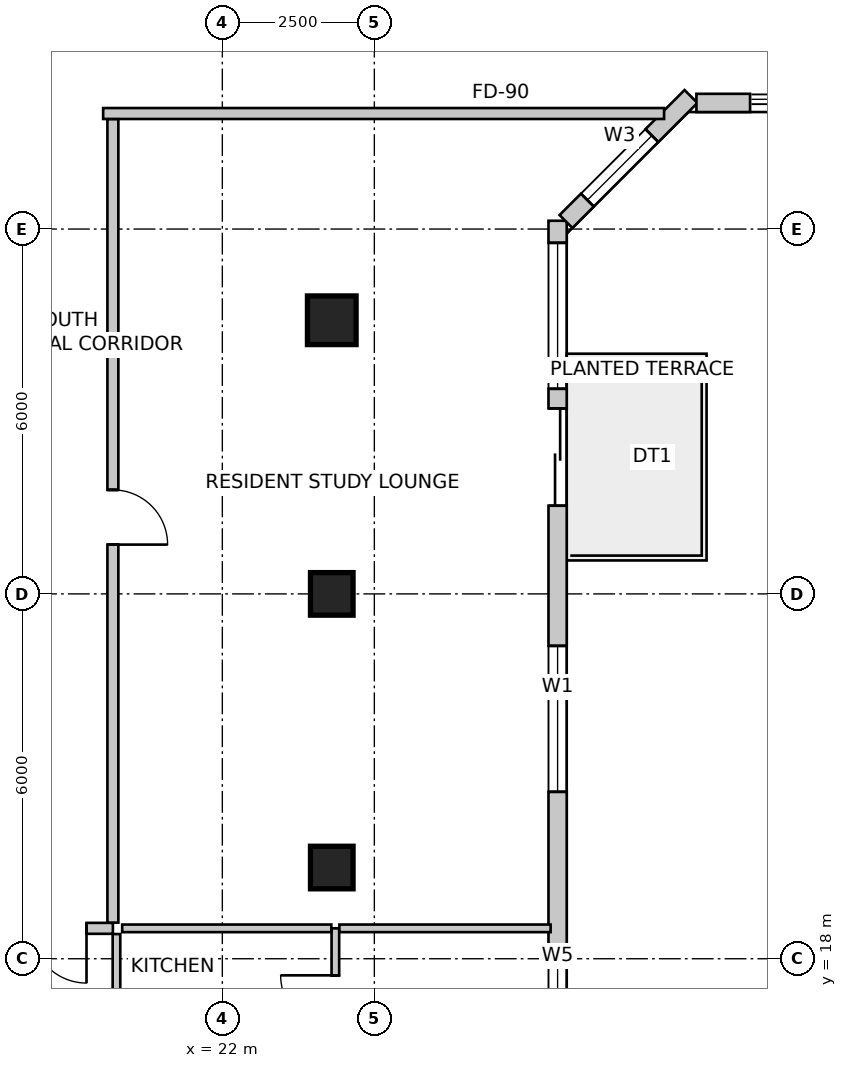
"""IFC4 building model, lengths in metres.
Left out: names, types, materials, properties, quantities, classifications, styles, units other than length and angle.
Written with IfcOpenShell. Run it as: python <this file> out.ifc"""

import sys

from ifc_helpers import new_model, si_unit, direction, frame, frame_2d, origin, origin_2d, place, context, subcontext, project, spatial, rectangle, extrude, source, transform, mapped, element, fill, save


model = new_model("IFC4")
c1 = context("Model", 3, precision=1e-05, world=origin(), true_north=direction((0.0, 1.0)))
c2 = subcontext(c1, "Body", "Model", "MODEL_VIEW")
j1 = project(units=[si_unit("LENGTHUNIT", "METRE"), si_unit("PLANEANGLEUNIT", "RADIAN")], contexts=[c1])
p1 = place(None, origin())
s1 = spatial("IfcSite", under=j1, at=p1, CompositionType="ELEMENT")
p2 = place(p1, origin())
s2 = spatial("IfcBuilding", under=s1, at=p2, CompositionType="ELEMENT")
p3 = place(p2, frame((0.0, 0.0, 193.9)))
s3 = spatial("IfcBuildingStorey", under=s2, at=p3, CompositionType="ELEMENT", Elevation=193.9)
m1 = source(origin(), c2, "Body", "SweptSolid", [
    extrude(rectangle(XDim=0.8, YDim=0.8, at=origin_2d()), origin(), (0.0, 0.0, 1.0), 3.5),
])
p4 = place(p3, frame((23.8, 28.5, 0.0), z_axis=(0.0, 0.0, 1.0), x_axis=(1.0, 0.0, 0.0)))
e1 = element("IfcColumn", 1, at=p4, inside=s3, PredefinedType="COLUMN", context=c2, shape_type="MappedRepresentation", body=[
    mapped(m1, transform((0.0, 0.0, 0.0), scale=1.0)),
])
m2 = source(origin(), c2, "Body", "SweptSolid", [
    extrude(rectangle(XDim=0.7, YDim=0.7, at=origin_2d()), origin(), (0.0, 0.0, 1.0), 3.5),
])
for number, where, z_axis, x_axis in (
    (2, (23.8, 24.0, 0.0), (0.0, 0.0, 1.0), (1.0, 0.0, 0.0)),
    (3, (23.8, 19.5, 0.0), (0.0, 0.0, 1.0), (1.0, 0.0, 0.0)),
):
    element("IfcColumn", number, at=place(p3, frame(where, z_axis=z_axis, x_axis=x_axis)), inside=s3, PredefinedType="COLUMN", context=c2, shape_type="MappedRepresentation", body=[
        mapped(m2, transform((0.0, 0.0, 0.0), scale=1.0)),
    ])
p5 = place(p3, frame((27.514, 16.457, 0.0), z_axis=(0.0, 0.0, 1.0), x_axis=(0.0, 1.0, 0.0)))
e4 = element("IfcWall", 4, at=p5, inside=s3, PredefinedType="SOLIDWALL", context=c2, shape_type="SweptSolid", body=[
    extrude(rectangle(XDim=13.679, YDim=0.3, at=frame_2d((6.839, 0.0))), origin(), (0.0, 0.0, 1.0), 3.25),
])
m3 = source(origin(), c2, "Body", "SweptSolid", [
    extrude(rectangle(XDim=1.6, YDim=2.15, at=frame_2d((0.8, 1.075))), frame((0.0, 0.16, 0.0), z_axis=(0.0, -1.0, 0.0), x_axis=(1.0, 0.0, 0.0)), (0.0, 0.0, 1.0), 0.32),
])
p6 = place(p5, frame((8.993, 0.0, 0.0)))
e5 = element("IfcOpeningElement", 5, at=p6, cuts=e4, PredefinedType="OPENING", context=c2, shape_type="MappedRepresentation", body=[
    mapped(m3, transform((0.0, 0.0, 0.0), scale=1.0)),
])
m4 = source(origin(), c2, "Body", "SweptSolid", [
    extrude(rectangle(XDim=1.2, YDim=1.6, at=frame_2d((0.6, 0.8))), frame((0.0, 0.16, 0.0), z_axis=(0.0, -1.0, 0.0), x_axis=(1.0, 0.0, 0.0)), (0.0, 0.0, 1.0), 0.32),
])
p7 = place(p5, frame((0.471, 0.0, 0.85)))
e6 = element("IfcOpeningElement", 6, at=p7, cuts=e4, PredefinedType="OPENING", context=c2, shape_type="MappedRepresentation", body=[
    mapped(m4, transform((0.0, 0.0, 0.0), scale=1.0)),
])
m5 = source(origin(), c2, "Body", "SweptSolid", [
    extrude(rectangle(XDim=2.4, YDim=2.2, at=frame_2d((1.2, 1.1))), frame((0.0, 0.16, 0.0), z_axis=(0.0, -1.0, 0.0), x_axis=(1.0, 0.0, 0.0)), (0.0, 0.0, 1.0), 0.32),
])
p8 = place(p5, frame((4.288, 0.0, 0.85)))
e7 = element("IfcOpeningElement", 7, at=p8, cuts=e4, PredefinedType="OPENING", context=c2, shape_type="MappedRepresentation", body=[
    mapped(m5, transform((0.0, 0.0, 0.0), scale=1.0)),
])
p9 = place(p5, frame((10.916, 0.0, 0.85)))
e8 = element("IfcOpeningElement", 8, at=p9, cuts=e4, PredefinedType="OPENING", context=c2, shape_type="MappedRepresentation", body=[
    mapped(m5, transform((0.0, 0.0, 0.0), scale=1.0)),
])
p10 = place(p3, frame((27.652, 30.124, 0.0), z_axis=(0.0, 0.0, 1.0), x_axis=(0.707064797706, 0.707148762175, 0.0)))
e9 = element("IfcWall", 9, at=p10, inside=s3, PredefinedType="SOLIDWALL", context=c2, shape_type="SweptSolid", body=[
    extrude(rectangle(XDim=2.908, YDim=0.3, at=frame_2d((1.454, 0.0))), origin(), (0.0, 0.0, 1.0), 3.25),
])
m6 = source(origin(), c2, "Body", "SweptSolid", [
    extrude(rectangle(XDim=1.5, YDim=1.8, at=frame_2d((0.75, 0.9))), frame((0.0, 0.16, 0.0), z_axis=(0.0, -1.0, 0.0), x_axis=(1.0, 0.0, 0.0)), (0.0, 0.0, 1.0), 0.32),
])
p11 = place(p10, frame((0.498, 0.0, 0.85)))
e10 = element("IfcOpeningElement", 10, at=p11, cuts=e9, PredefinedType="OPENING", context=c2, shape_type="MappedRepresentation", body=[
    mapped(m6, transform((0.0, 0.0, 0.0), scale=1.0)),
])
p12 = place(p3, frame((29.797, 32.074, 0.0), z_axis=(0.0, 0.0, 1.0), x_axis=(1.0, 0.0, 0.0)))
e11 = element("IfcWall", 11, at=p12, inside=s3, PredefinedType="SOLIDWALL", context=c2, shape_type="SweptSolid", body=[
    extrude(rectangle(XDim=0.882, YDim=0.3, at=frame_2d((0.441, 0.0))), origin(), (0.0, 0.0, 1.0), 3.25),
])
p13 = place(p3, frame((29.265, 31.9, 0.0), z_axis=(0.0, 0.0, 1.0), x_axis=(-1.0, 0.0, 0.0)))
e12 = element("IfcWall", 12, at=p13, inside=s3, PredefinedType="PARTITIONING", context=c2, shape_type="SweptSolid", body=[
    extrude(rectangle(XDim=9.225, YDim=0.18, at=frame_2d((4.613, 0.0))), origin(), (0.0, 0.0, 1.0), 2.835),
])
p14 = place(p3, frame((20.2, 18.5, 0.0), z_axis=(0.0, 0.0, 1.0), x_axis=(-1.0, 0.0, 0.0)))
e13 = element("IfcWall", 13, at=p14, inside=s3, PredefinedType="PARTITIONING", context=c2, shape_type="SweptSolid", body=[
    extrude(rectangle(XDim=1.706, YDim=0.18, at=frame_2d((0.853, 0.0))), origin(), (0.0, 0.0, 1.0), 3.25),
])
m7 = source(origin(), c2, "Body", "SweptSolid", [
    extrude(rectangle(XDim=0.9, YDim=2.15, at=frame_2d((0.45, 1.075))), frame((0.0, 0.1, 0.0), z_axis=(0.0, -1.0, 0.0), x_axis=(1.0, 0.0, 0.0)), (0.0, 0.0, 1.0), 0.2),
])
p15 = place(p14, frame((0.434, 0.0, 0.0)))
e14 = element("IfcOpeningElement", 14, at=p15, cuts=e13, PredefinedType="OPENING", context=c2, shape_type="MappedRepresentation", body=[
    mapped(m7, transform((0.0, 0.0, 0.0), scale=1.0)),
])
p16 = place(p3, frame((20.2, 31.806, 0.0), z_axis=(0.0, 0.0, 1.0), x_axis=(0.0, -1.0, 0.0)))
e15 = element("IfcWall", 15, at=p16, inside=s3, PredefinedType="PARTITIONING", context=c2, shape_type="SweptSolid", body=[
    extrude(rectangle(XDim=13.212, YDim=0.18, at=frame_2d((6.606, 0.0))), origin(), (0.0, 0.0, 1.0), 2.688),
])
p17 = place(p16, frame((6.095, 0.0, 0.0)))
e16 = element("IfcOpeningElement", 16, at=p17, cuts=e15, PredefinedType="OPENING", context=c2, shape_type="MappedRepresentation", body=[
    mapped(m7, transform((0.0, 0.0, 0.0), scale=1.0)),
])
p18 = place(p3, frame((23.859, 15.315, 0.0), z_axis=(0.0, 0.0, 1.0), x_axis=(0.0, 1.0, 0.0)))
e17 = element("IfcWall", 17, at=p18, inside=s3, PredefinedType="PARTITIONING", context=c2, shape_type="SweptSolid", body=[
    extrude(rectangle(XDim=3.185, YDim=0.125, at=frame_2d((1.593, 0.0))), origin(), (0.0, 0.0, 1.0), 2.542),
])
m8 = source(origin(), c2, "Body", "SweptSolid", [
    extrude(rectangle(XDim=0.9, YDim=2.15, at=frame_2d((0.45, 1.075))), frame((0.0, 0.073, 0.0), z_axis=(0.0, -1.0, 0.0), x_axis=(1.0, 0.0, 0.0)), (0.0, 0.0, 1.0), 0.145),
])
p19 = place(p18, frame((1.512, 0.0, 0.0)))
e18 = element("IfcOpeningElement", 18, at=p19, cuts=e17, PredefinedType="OPENING", context=c2, shape_type="MappedRepresentation", body=[
    mapped(m8, transform((0.0, 0.0, 0.0), scale=1.0)),
])
p20 = place(p3, frame((23.926, 18.5, 0.0), z_axis=(0.0, 0.0, 1.0), x_axis=(1.0, 0.0, 0.0)))
e19 = element("IfcWall", 19, at=p20, inside=s3, PredefinedType="PARTITIONING", context=c2, shape_type="SweptSolid", body=[
    extrude(rectangle(XDim=3.473, YDim=0.125, at=frame_2d((1.737, 0.0))), origin(), (0.0, 0.0, 1.0), 3.25),
])
p21 = place(p3, frame((20.259, 18.406, 0.0), z_axis=(0.0, 0.0, 1.0), x_axis=(0.0, -1.0, 0.0)))
e20 = element("IfcWall", 20, at=p21, inside=s3, PredefinedType="PARTITIONING", context=c2, shape_type="SweptSolid", body=[
    extrude(rectangle(XDim=3.091, YDim=0.125, at=frame_2d((1.545, 0.0))), origin(), (0.0, 0.0, 1.0), 2.688),
])
m9 = source(origin(), c2, "Body", "SweptSolid", [
    extrude(rectangle(XDim=0.85, YDim=2.15, at=frame_2d((0.425, 1.075))), frame((0.0, 0.073, 0.0), z_axis=(0.0, -1.0, 0.0), x_axis=(1.0, 0.0, 0.0)), (0.0, 0.0, 1.0), 0.145),
])
p22 = place(p21, frame((1.121, 0.0, 0.0)))
e21 = element("IfcOpeningElement", 21, at=p22, cuts=e20, PredefinedType="OPENING", context=c2, shape_type="MappedRepresentation", body=[
    mapped(m9, transform((0.0, 0.0, 0.0), scale=1.0)),
])
p23 = place(p3, frame((20.353, 18.5, 0.0), z_axis=(0.0, 0.0, 1.0), x_axis=(1.0, 0.0, 0.0)))
e22 = element("IfcWall", 22, at=p23, inside=s3, PredefinedType="PARTITIONING", context=c2, shape_type="SweptSolid", body=[
    extrude(rectangle(XDim=3.439, YDim=0.125, at=frame_2d((1.72, 0.0))), origin(), (0.0, 0.0, 1.0), 2.542),
])
m10 = source(origin(), c2, "Body", "SweptSolid", [
    extrude(rectangle(XDim=1.6, YDim=2.15, at=frame_2d((0.8, 1.075))), frame((0.0, 0.025, 0.0), z_axis=(0.0, -1.0, 0.0), x_axis=(1.0, 0.0, 0.0)), (0.0, 0.0, 1.0), 0.05),
])
p24 = place(p6, origin())
e23 = element("IfcDoor", 23, at=p24, inside=s3, OperationType="DOUBLE_DOOR_SLIDING", PredefinedType="DOOR", context=c2, shape_type="MappedRepresentation", body=[
    mapped(m10, transform((0.0, 0.0, 0.0), scale=1.0)),
])
fill(e5, e23)
m11 = source(origin(), c2, "Body", "SweptSolid", [
    extrude(rectangle(XDim=1.2, YDim=1.6, at=frame_2d((0.6, 0.8))), frame((0.0, -0.015, 0.0), z_axis=(0.0, -1.0, 0.0), x_axis=(1.0, 0.0, 0.0)), (0.0, 0.0, 1.0), 0.06),
])
p25 = place(p7, origin())
e24 = element("IfcWindow", 24, at=p25, inside=s3, PartitioningType="SINGLE_PANEL", PredefinedType="WINDOW", context=c2, shape_type="MappedRepresentation", body=[
    mapped(m11, transform((0.0, 0.0, 0.0), scale=1.0)),
])
fill(e6, e24)
m12 = source(origin(), c2, "Body", "SweptSolid", [
    extrude(rectangle(XDim=2.4, YDim=2.2, at=frame_2d((1.2, 1.1))), frame((0.0, -0.015, 0.0), z_axis=(0.0, -1.0, 0.0), x_axis=(1.0, 0.0, 0.0)), (0.0, 0.0, 1.0), 0.06),
])
p26 = place(p8, origin())
e25 = element("IfcWindow", 25, at=p26, inside=s3, PartitioningType="SINGLE_PANEL", PredefinedType="WINDOW", context=c2, shape_type="MappedRepresentation", body=[
    mapped(m12, transform((0.0, 0.0, 0.0), scale=1.0)),
])
fill(e7, e25)
p27 = place(p9, origin())
e26 = element("IfcWindow", 26, at=p27, inside=s3, PartitioningType="SINGLE_PANEL", PredefinedType="WINDOW", context=c2, shape_type="MappedRepresentation", body=[
    mapped(m12, transform((0.0, 0.0, 0.0), scale=1.0)),
])
fill(e8, e26)
m13 = source(origin(), c2, "Body", "SweptSolid", [
    extrude(rectangle(XDim=1.5, YDim=1.8, at=frame_2d((0.75, 0.9))), frame((0.0, -0.015, 0.0), z_axis=(0.0, -1.0, 0.0), x_axis=(1.0, 0.0, 0.0)), (0.0, 0.0, 1.0), 0.06),
])
p28 = place(p11, origin())
e27 = element("IfcWindow", 27, at=p28, inside=s3, PartitioningType="SINGLE_PANEL", PredefinedType="WINDOW", context=c2, shape_type="MappedRepresentation", body=[
    mapped(m13, transform((0.0, 0.0, 0.0), scale=1.0)),
])
fill(e10, e27)
m14 = source(origin(), c2, "Body", "SweptSolid", [
    extrude(rectangle(XDim=0.9, YDim=2.15, at=frame_2d((0.45, 1.075))), frame((0.0, 0.025, 0.0), z_axis=(0.0, -1.0, 0.0), x_axis=(1.0, 0.0, 0.0)), (0.0, 0.0, 1.0), 0.05),
])
p29 = place(p19, origin())
e28 = element("IfcDoor", 28, at=p29, inside=s3, OperationType="SINGLE_SWING_RIGHT", PredefinedType="DOOR", context=c2, shape_type="MappedRepresentation", body=[
    mapped(m14, transform((0.0, 0.0, 0.0), scale=1.0)),
])
fill(e18, e28)
m15 = source(origin(), c2, "Body", "SweptSolid", [
    extrude(rectangle(XDim=0.9, YDim=2.15, at=frame_2d((0.45, 1.075))), frame((0.0, 0.025, 0.0), z_axis=(0.0, -1.0, 0.0), x_axis=(1.0, 0.0, 0.0)), (0.0, 0.0, 1.0), 0.05),
])
p30 = place(p15, origin())
e29 = element("IfcDoor", 29, at=p30, inside=s3, OperationType="SINGLE_SWING_LEFT", PredefinedType="DOOR", context=c2, shape_type="MappedRepresentation", body=[
    mapped(m15, transform((0.0, 0.0, 0.0), scale=1.0)),
])
fill(e14, e29)
p31 = place(p17, origin())
e30 = element("IfcDoor", 30, at=p31, inside=s3, OperationType="SINGLE_SWING_RIGHT", PredefinedType="DOOR", context=c2, shape_type="MappedRepresentation", body=[
    mapped(m14, transform((0.0, 0.0, 0.0), scale=1.0)),
])
fill(e16, e30)
save(model, sys.argv[1])
